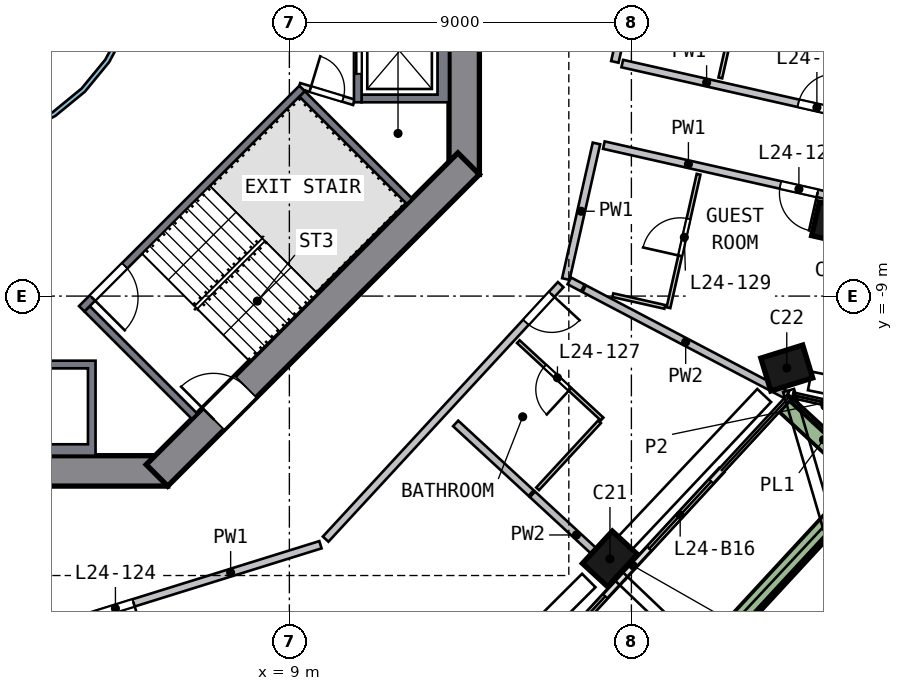
"""IFC4 building model, lengths in metres.
Left out: names, types, materials, properties, quantities, classifications, styles, units other than length and angle.
Written with IfcOpenShell. Run it as: python <this file> out.ifc"""

import sys

from ifc_helpers import new_model, si_unit, direction, frame, frame_2d, origin, origin_2d, place, context, subcontext, project, spatial, polyline, rectangle, outline, extrude, element, fill, save


model = new_model("IFC4")
c1 = context("Model", 3, precision=1e-05, world=origin(), true_north=direction((0.0, 1.0)))
c2 = subcontext(c1, "Body", "Model", "MODEL_VIEW")
j1 = project(units=[si_unit("LENGTHUNIT", "METRE"), si_unit("PLANEANGLEUNIT", "RADIAN")], contexts=[c1])
p1 = place(None, origin())
s1 = spatial("IfcSite", under=j1, at=p1, CompositionType="ELEMENT")
p2 = place(p1, origin())
s2 = spatial("IfcBuilding", under=s1, at=p2, CompositionType="ELEMENT")
p3 = place(p2, frame((0.0, 0.0, 103.5)))
s3 = spatial("IfcBuildingStorey", under=s2, at=p3, CompositionType="ELEMENT", Elevation=103.5)
p4 = place(p3, frame((17.344, -16.016, 0.0), z_axis=(0.075517991, 0.083123025, 0.993673787), x_axis=(0.674399767, 0.729776299, -0.112300969)))
e1 = element("IfcColumn", 1, at=p4, inside=s3, PredefinedType="COLUMN", context=c2, shape_type="SweptSolid", body=[
    extrude(rectangle(XDim=1.15, YDim=0.9, at=origin_2d()), origin(), (0.0, 0.0, 1.0), 3.21),
])
p5 = place(p3, frame((22.026, -11.02, 0.0), z_axis=(0.051533576, 0.105119374, 0.99312346), x_axis=(-0.953890651, -0.289264774, 0.080115647)))
e2 = element("IfcColumn", 2, at=p5, inside=s3, PredefinedType="COLUMN", context=c2, shape_type="SweptSolid", body=[
    extrude(rectangle(XDim=1.15, YDim=0.9, at=origin_2d()), origin(), (0.0, 0.0, 1.0), 3.212),
])
p6 = place(p3, frame((23.243, -7.201, 0.0), z_axis=(0.033297151, 0.110762439, 0.993288972), x_axis=(0.975227219, -0.221059294, -0.008041186)))
e3 = element("IfcColumn", 3, at=p6, inside=s3, PredefinedType="COLUMN", context=c2, shape_type="SweptSolid", body=[
    extrude(rectangle(XDim=0.9, YDim=0.9, at=origin_2d()), origin(), (0.0, 0.0, 1.0), 3.211),
])
p7 = place(p3, frame((13.6, -5.799, 0.0), z_axis=(0.0, 0.0, 1.0), x_axis=(0.0, 1.0, 0.0)))
e4 = element("IfcWall", 4, at=p7, inside=s3, PredefinedType="SHEAR", context=c2, shape_type="SweptSolid", body=[
    extrude(rectangle(XDim=11.598, YDim=0.8, at=frame_2d((5.799, 0.0))), origin(), (0.0, 0.0, 1.0), 3.5),
])
p8 = place(p7, frame((4.899, 0.0, 0.0)))
e5 = element("IfcOpeningElement", 5, at=p8, cuts=e4, PredefinedType="OPENING", context=c2, shape_type="SweptSolid", body=[
    extrude(rectangle(XDim=1.8, YDim=2.1, at=frame_2d((0.9, 1.05))), frame((0.0, 0.41, 0.0), z_axis=(0.0, -1.0, 0.0), x_axis=(1.0, 0.0, 0.0)), (0.0, 0.0, 1.0), 0.82),
])
p9 = place(p3, frame((-5.799, -13.6, 0.0), z_axis=(0.0, 0.0, 1.0), x_axis=(1.0, 0.0, 0.0)))
e6 = element("IfcWall", 6, at=p9, inside=s3, PredefinedType="SHEAR", context=c2, shape_type="SweptSolid", body=[
    extrude(rectangle(XDim=11.598, YDim=0.8, at=frame_2d((5.799, 0.0))), origin(), (0.0, 0.0, 1.0), 3.5),
])
p10 = place(p9, frame((4.899, 0.0, 0.0)))
e7 = element("IfcOpeningElement", 7, at=p10, cuts=e6, PredefinedType="OPENING", context=c2, shape_type="SweptSolid", body=[
    extrude(rectangle(XDim=1.8, YDim=2.1, at=frame_2d((0.9, 1.05))), frame((0.0, 0.41, 0.0), z_axis=(0.0, -1.0, 0.0), x_axis=(1.0, 0.0, 0.0)), (0.0, 0.0, 1.0), 0.82),
])
p11 = place(p3, frame((5.516, -13.717, 0.0), z_axis=(0.0, 0.0, 1.0), x_axis=(0.707106781, 0.707106781, 0.0)))
e8 = element("IfcWall", 8, at=p11, inside=s3, PredefinedType="SHEAR", context=c2, shape_type="SweptSolid", body=[
    extrude(rectangle(XDim=11.598, YDim=0.8, at=frame_2d((5.799, 0.0))), origin(), (0.0, 0.0, 1.0), 3.5),
])
p12 = place(p11, frame((2.099, 0.0, 0.0)))
e9 = element("IfcOpeningElement", 9, at=p12, cuts=e8, PredefinedType="OPENING", context=c2, shape_type="SweptSolid", body=[
    extrude(rectangle(XDim=1.2, YDim=2.1, at=frame_2d((0.6, 1.05))), frame((0.0, 0.41, 0.0), z_axis=(0.0, -1.0, 0.0), x_axis=(1.0, 0.0, 0.0)), (0.0, 0.0, 1.0), 0.82),
])
p13 = place(p3, frame((15.409, -18.959, 0.0), z_axis=(0.0, 0.0, 1.0), x_axis=(0.67837347, 0.734717248, 0.0)))
e10 = element("IfcWall", 10, at=p13, inside=s3, PredefinedType="SOLIDWALL", context=c2, shape_type="SweptSolid", body=[
    extrude(rectangle(XDim=3.475, YDim=0.15, at=frame_2d((1.738, 0.0))), origin(), (0.0, 0.0, 1.0), 2.425),
])
p14 = place(p13, frame((0.4, 0.0, 0.0)))
e11 = element("IfcOpeningElement", 11, at=p14, cuts=e10, PredefinedType="OPENING", context=c2, shape_type="SweptSolid", body=[
    extrude(rectangle(XDim=2.4, YDim=2.4, at=frame_2d((1.2, 1.2))), frame((0.0, 0.085, 0.0), z_axis=(0.0, -1.0, 0.0), x_axis=(1.0, 0.0, 0.0)), (0.0, 0.0, 1.0), 0.17),
])
p15 = place(p3, frame((17.767, -16.406, 0.0), z_axis=(0.0, 0.0, 1.0), x_axis=(0.678446633, 0.734649689, 0.0)))
e12 = element("IfcWall", 12, at=p15, inside=s3, PredefinedType="SOLIDWALL", context=c2, shape_type="SweptSolid", body=[
    extrude(rectangle(XDim=3.836, YDim=0.15, at=frame_2d((1.918, 0.0))), origin(), (0.0, 0.0, 1.0), 2.425),
])
p16 = place(p15, frame((1.035, 0.0, 0.0)))
e13 = element("IfcOpeningElement", 13, at=p16, cuts=e12, PredefinedType="OPENING", context=c2, shape_type="SweptSolid", body=[
    extrude(rectangle(XDim=2.4, YDim=2.4, at=frame_2d((1.2, 1.2))), frame((0.0, 0.085, 0.0), z_axis=(0.0, -1.0, 0.0), x_axis=(1.0, 0.0, 0.0)), (0.0, 0.0, 1.0), 0.17),
])
p17 = place(p3, frame((15.089, -23.765, 0.0), z_axis=(0.0, 0.0, 1.0), x_axis=(0.678421217, 0.734673161, 0.0)))
e14 = element("IfcWall", 14, at=p17, inside=s3, PredefinedType="SOLIDWALL", context=c2, shape_type="SweptSolid", body=[
    extrude(rectangle(XDim=13.723, YDim=0.5, at=frame_2d((6.862, 0.0))), origin(), (0.0, 0.0, 1.0), 0.7),
])
p18 = place(p3, frame((24.046, -13.697, 0.0), z_axis=(0.0, 0.0, 1.0), x_axis=(-0.734678586, 0.678415341, 0.0)))
e15 = element("IfcWall", 15, at=p18, inside=s3, PredefinedType="SOLIDWALL", context=c2, shape_type="SweptSolid", body=[
    extrude(rectangle(XDim=2.699, YDim=0.5, at=frame_2d((1.35, 0.0))), origin(), (0.0, 0.0, 1.0), 0.7),
])
p19 = place(p3, origin())
e16 = element("IfcWall", 16, at=p19, inside=s3, PredefinedType="SOLIDWALL", context=c2, shape_type="SweptSolid", body=[
    extrude(outline(polyline([(13.2, -3.9), (10.9, -3.9), (10.9, -3.7), (12.9, -3.7), (12.9, -1.4), (10.9, -1.4), (10.9, -1.2), (13.2, -1.2), (13.2, -3.9)])), origin(), (0.0, 0.0, 1.0), 3.19),
])
p20 = place(p3, frame((10.8, -1.2, 0.0), z_axis=(0.0, 0.0, 1.0), x_axis=(0.0, -1.0, 0.0)))
e17 = element("IfcWall", 17, at=p20, inside=s3, PredefinedType="SOLIDWALL", context=c2, shape_type="SweptSolid", body=[
    extrude(rectangle(XDim=2.7, YDim=0.2, at=frame_2d((1.35, 0.0))), origin(), (0.0, 0.0, 1.0), 3.19),
])
p21 = place(p20, frame((0.75, 0.0, 0.0)))
e18 = element("IfcOpeningElement", 18, at=p21, cuts=e17, PredefinedType="OPENING", context=c2, shape_type="SweptSolid", body=[
    extrude(rectangle(XDim=1.2, YDim=2.1, at=frame_2d((0.6, 1.05))), frame((0.0, 0.11, 0.0), z_axis=(0.0, -1.0, 0.0), x_axis=(1.0, 0.0, 0.0)), (0.0, 0.0, 1.0), 0.22),
])
p22 = place(p3, origin())
e19 = element("IfcWall", 19, at=p22, inside=s3, PredefinedType="SOLIDWALL", context=c2, shape_type="SweptSolid", body=[
    extrude(outline(polyline([(3.9, -10.7), (3.9, -13.2), (1.2, -13.2), (1.2, -10.7), (3.9, -10.7)]), holes=[polyline([(1.4, -12.9), (3.7, -12.9), (3.7, -10.9), (1.4, -10.9), (1.4, -12.9)])]), origin(), (0.0, 0.0, 1.0), 3.19),
])
p23 = place(p3, frame((9.334, -3.535, 0.0), z_axis=(0.0, 0.0, 1.0), x_axis=(-0.707106781, -0.707106781, 0.0)))
e20 = element("IfcWall", 20, at=p23, inside=s3, PredefinedType="SOLIDWALL", context=c2, shape_type="SweptSolid", body=[
    extrude(rectangle(XDim=8.2, YDim=0.2, at=frame_2d((4.1, 0.0))), origin(), (0.0, 0.0, 1.0), 3.19),
])
p24 = place(p23, frame((6.6, 0.0, 0.0)))
e21 = element("IfcOpeningElement", 21, at=p24, cuts=e20, PredefinedType="OPENING", context=c2, shape_type="SweptSolid", body=[
    extrude(rectangle(XDim=1.2, YDim=2.1, at=frame_2d((0.6, 1.05))), frame((0.0, 0.11, 0.0), z_axis=(0.0, -1.0, 0.0), x_axis=(1.0, 0.0, 0.0)), (0.0, 0.0, 1.0), 0.22),
])
for number, where, z_axis, x_axis in (
    (22, (3.677, -9.334, 0.0), (0.0, 0.0, 1.0), (0.707, -0.707, 0.0)),
    (23, (9.334, -3.677, 0.0), (0.0, 0.0, 1.0), (0.707, -0.707, 0.0)),
):
    element("IfcWall", number, at=place(p3, frame(where, z_axis=z_axis, x_axis=x_axis)), inside=s3, PredefinedType="SOLIDWALL", context=c2, shape_type="SweptSolid", body=[
        extrude(rectangle(XDim=4.0, YDim=0.2, at=frame_2d((2.0, 0.0))), origin(), (0.0, 0.0, 1.0), 3.19),
    ])
p25 = place(p3, frame((9.263, -3.465, 0.0), z_axis=(0.0, 0.0, 1.0), x_axis=(0.957084567, -0.289808785, 0.0)))
e24 = element("IfcWall", 24, at=p25, inside=s3, PredefinedType="PARTITIONING", context=c2, shape_type="SweptSolid", body=[
    extrude(rectangle(XDim=1.501, YDim=0.15, at=frame_2d((0.75, 0.0))), origin(), (0.0, 0.0, 1.0), 3.19),
])
p26 = place(p25, frame((0.301, 0.0, 0.0)))
e25 = element("IfcOpeningElement", 25, at=p26, cuts=e24, PredefinedType="OPENING", context=c2, shape_type="SweptSolid", body=[
    extrude(rectangle(XDim=0.9, YDim=2.1, at=frame_2d((0.45, 1.05))), frame((0.0, 0.085, 0.0), z_axis=(0.0, -1.0, 0.0), x_axis=(1.0, 0.0, 0.0)), (0.0, 0.0, 1.0), 0.17),
])
p27 = place(p3, origin())
e26 = element("IfcWall", 26, at=p27, inside=s3, PredefinedType="SOLIDWALL", context=c2, shape_type="SweptSolid", body=[
    extrude(outline(polyline([(5.021, -0.999), (4.73, -1.959), (4.257, -2.844), (3.62, -3.62), (2.844, -4.257), (1.959, -4.73), (0.999, -5.021), (0.0, -5.12), (-0.999, -5.021), (-1.959, -4.73), (-2.844, -4.257), (-3.62, -3.62), (-4.257, -2.844), (-4.73, -1.959), (-5.021, -0.999), (-5.12, 0.0), (-5.021, 0.999), (-4.73, 1.959), (-4.257, 2.844), (-3.62, 3.62), (-2.844, 4.257), (-1.959, 4.73), (-0.999, 5.021), (0.0, 5.12), (0.999, 5.021), (1.959, 4.73), (2.844, 4.257), (3.62, 3.62), (4.257, 2.844), (4.73, 1.959), (5.021, 0.999), (5.12, 0.0), (5.021, -0.999)]), holes=[polyline([(4.904, 0.976), (4.619, 1.913), (4.157, 2.778), (3.535, 3.535), (2.778, 4.157), (1.913, 4.619), (0.976, 4.904), (0.0, 5.0), (-0.976, 4.904), (-1.913, 4.619), (-2.778, 4.157), (-3.535, 3.535), (-4.157, 2.778), (-4.619, 1.913), (-4.904, 0.976), (-5.0, 0.0), (-4.904, -0.976), (-4.619, -1.913), (-4.157, -2.778), (-3.535, -3.535), (-2.778, -4.157), (-1.913, -4.619), (-0.976, -4.904), (0.0, -5.0), (0.976, -4.904), (1.913, -4.619), (2.778, -4.157), (3.535, -3.535), (4.157, -2.778), (4.619, -1.913), (4.904, -0.976), (5.0, 0.0), (4.904, 0.976)])]), origin(), (0.0, 0.0, 1.0), 3.19),
])
p28 = place(p3, frame((9.818, -15.543, 0.0), z_axis=(0.0, 0.0, 1.0), x_axis=(-0.954863879, -0.297043721, 0.0)))
e27 = element("IfcWall", 27, at=p28, inside=s3, PredefinedType="SOLIDWALL", context=c2, shape_type="SweptSolid", body=[
    extrude(rectangle(XDim=9.316, YDim=0.2, at=frame_2d((4.658, 0.0))), origin(), (0.0, 0.0, 1.0), 3.19),
])
p29 = place(p28, frame((5.15, 0.0, 0.0)))
e28 = element("IfcOpeningElement", 28, at=p29, cuts=e27, PredefinedType="OPENING", context=c2, shape_type="SweptSolid", body=[
    extrude(rectangle(XDim=1.0, YDim=2.1, at=frame_2d((0.5, 1.05))), frame((0.0, 0.11, 0.0), z_axis=(0.0, -1.0, 0.0), x_axis=(1.0, 0.0, 0.0)), (0.0, 0.0, 1.0), 0.22),
])
p30 = place(p3, frame((16.139, -8.698, 0.0), z_axis=(0.0, 0.0, 1.0), x_axis=(-0.678413568, -0.734680223, 0.0)))
e29 = element("IfcWall", 29, at=p30, inside=s3, PredefinedType="SOLIDWALL", context=c2, shape_type="SweptSolid", body=[
    extrude(rectangle(XDim=9.116, YDim=0.2, at=frame_2d((4.558, 0.0))), origin(), (0.0, 0.0, 1.0), 3.19),
])
p31 = place(p30, frame((0.35, 0.0, 0.0)))
e30 = element("IfcOpeningElement", 30, at=p31, cuts=e29, PredefinedType="OPENING", context=c2, shape_type="SweptSolid", body=[
    extrude(rectangle(XDim=1.0, YDim=2.1, at=frame_2d((0.5, 1.05))), frame((0.0, 0.11, 0.0), z_axis=(0.0, -1.0, 0.0), x_axis=(1.0, 0.0, 0.0)), (0.0, 0.0, 1.0), 0.22),
])
for number, where, z_axis, x_axis in (
    (31, (16.275, -8.552, 0.0), (0.0, 0.0, 1.0), (0.22, 0.975, 0.0)),
    (32, (17.565, -2.837, 0.0), (0.0, 0.0, 1.0), (0.22, 0.975, 0.0)),
):
    element("IfcWall", number, at=place(p3, frame(where, z_axis=z_axis, x_axis=x_axis)), inside=s3, PredefinedType="SOLIDWALL", context=c2, shape_type="SweptSolid", body=[
        extrude(rectangle(XDim=3.658, YDim=0.2, at=frame_2d((1.829, 0.0))), origin(), (0.0, 0.0, 1.0), 3.19),
    ])
p32 = place(p3, frame((25.139, -6.802, 0.0), z_axis=(0.0, 0.0, 1.0), x_axis=(-0.975455482, 0.220196734, 0.0)))
e33 = element("IfcWall", 33, at=p32, inside=s3, PredefinedType="SOLIDWALL", context=c2, shape_type="SweptSolid", body=[
    extrude(rectangle(XDim=8.062, YDim=0.2, at=frame_2d((4.031, 0.0))), origin(), (0.0, 0.0, 1.0), 3.19),
])
p33 = place(p32, frame((2.3, 0.0, 0.0)))
e34 = element("IfcOpeningElement", 34, at=p33, cuts=e33, PredefinedType="OPENING", context=c2, shape_type="SweptSolid", body=[
    extrude(rectangle(XDim=1.0, YDim=2.1, at=frame_2d((0.5, 1.05))), frame((0.0, 0.11, 0.0), z_axis=(0.0, -1.0, 0.0), x_axis=(1.0, 0.0, 0.0)), (0.0, 0.0, 1.0), 0.22),
])
p34 = place(p3, frame((17.76, -2.881, 0.0), z_axis=(0.0, 0.0, 1.0), x_axis=(0.975455482, -0.220196734, 0.0)))
e35 = element("IfcWall", 35, at=p34, inside=s3, PredefinedType="SOLIDWALL", context=c2, shape_type="SweptSolid", body=[
    extrude(rectangle(XDim=8.062, YDim=0.2, at=frame_2d((4.031, 0.0))), origin(), (0.0, 0.0, 1.0), 3.19),
])
p35 = place(p34, frame((4.75, 0.0, 0.0)))
e36 = element("IfcOpeningElement", 36, at=p35, cuts=e35, PredefinedType="OPENING", context=c2, shape_type="SweptSolid", body=[
    extrude(rectangle(XDim=1.0, YDim=2.1, at=frame_2d((0.5, 1.05))), frame((0.0, 0.11, 0.0), z_axis=(0.0, -1.0, 0.0), x_axis=(1.0, 0.0, 0.0)), (0.0, 0.0, 1.0), 0.22),
])
p36 = place(p3, frame((13.375, -12.351, 0.0), z_axis=(0.0, 0.0, 1.0), x_axis=(0.734709995, -0.678381326, 0.0)))
e37 = element("IfcWall", 37, at=p36, inside=s3, PredefinedType="SOLIDWALL", context=c2, shape_type="SweptSolid", body=[
    extrude(rectangle(XDim=2.705, YDim=0.2, at=frame_2d((1.352, 0.0))), origin(), (0.0, 0.0, 1.0), 3.19),
])
p37 = place(p3, frame((16.366, -8.6, 0.0), z_axis=(0.0, 0.0, 1.0), x_axis=(0.885247719, -0.465119852, 0.0)))
e38 = element("IfcWall", 38, at=p37, inside=s3, PredefinedType="SOLIDWALL", context=c2, shape_type="SweptSolid", body=[
    extrude(rectangle(XDim=0.402, YDim=0.2, at=frame_2d((0.201, 0.0))), origin(), (0.0, 0.0, 1.0), 3.19),
])
p38 = place(p3, frame((15.396, -14.217, 0.0), z_axis=(0.0, 0.0, 1.0), x_axis=(0.734663861, -0.678431287, 0.0)))
e39 = element("IfcWall", 39, at=p38, inside=s3, PredefinedType="SOLIDWALL", context=c2, shape_type="SweptSolid", body=[
    extrude(rectangle(XDim=3.152, YDim=0.2, at=frame_2d((1.576, 0.0))), origin(), (0.0, 0.0, 1.0), 3.19),
])
p39 = place(p3, frame((16.758, -8.805, 0.0), z_axis=(0.0, 0.0, 1.0), x_axis=(0.88523924, -0.465135989, 0.0)))
e40 = element("IfcWall", 40, at=p39, inside=s3, PredefinedType="SOLIDWALL", context=c2, shape_type="SweptSolid", body=[
    extrude(rectangle(XDim=6.034, YDim=0.2, at=frame_2d((3.017, 0.0))), origin(), (0.0, 0.0, 1.0), 3.19),
])
p40 = place(p3, frame((17.229, -12.235, 0.0), z_axis=(0.0, 0.0, 1.0), x_axis=(-0.73466614, 0.678428819, 0.0)))
e41 = element("IfcWall", 41, at=p40, inside=s3, PredefinedType="PARTITIONING", context=c2, shape_type="SweptSolid", body=[
    extrude(rectangle(XDim=3.0, YDim=0.1, at=frame_2d((1.5, 0.0))), origin(), (0.0, 0.0, 1.0), 3.19),
])
p41 = place(p40, frame((1.15, 0.0, 0.0)))
e42 = element("IfcOpeningElement", 42, at=p41, cuts=e41, PredefinedType="OPENING", context=c2, shape_type="SweptSolid", body=[
    extrude(rectangle(XDim=0.9, YDim=2.1, at=frame_2d((0.45, 1.05))), frame((0.0, 0.06, 0.0), z_axis=(0.0, -1.0, 0.0), x_axis=(1.0, 0.0, 0.0)), (0.0, 0.0, 1.0), 0.12),
])
p42 = place(p3, frame((17.162, -12.308, 0.0), z_axis=(0.0, 0.0, 1.0), x_axis=(-0.67847442, -0.734624027, 0.0)))
e43 = element("IfcWall", 43, at=p42, inside=s3, PredefinedType="PARTITIONING", context=c2, shape_type="SweptSolid", body=[
    extrude(rectangle(XDim=2.4, YDim=0.1, at=frame_2d((1.2, 0.0))), origin(), (0.0, 0.0, 1.0), 3.19),
])
p43 = place(p3, frame((18.877, -9.284, 0.0), z_axis=(0.0, 0.0, 1.0), x_axis=(-0.975462778, 0.220164411, 0.0)))
e44 = element("IfcWall", 44, at=p43, inside=s3, PredefinedType="PARTITIONING", context=c2, shape_type="SweptSolid", body=[
    extrude(rectangle(XDim=1.398, YDim=0.1, at=frame_2d((0.699, 0.0))), origin(), (0.0, 0.0, 1.0), 3.19),
])
p44 = place(p3, frame((18.975, -9.306, 0.0), z_axis=(0.0, 0.0, 1.0), x_axis=(0.220210913, 0.975452282, 0.0)))
e45 = element("IfcWall", 45, at=p44, inside=s3, PredefinedType="PARTITIONING", context=c2, shape_type="SweptSolid", body=[
    extrude(rectangle(XDim=3.6, YDim=0.1, at=frame_2d((1.8, 0.0))), origin(), (0.0, 0.0, 1.0), 3.19),
])
p45 = place(p44, frame((1.4, 0.0, 0.0)))
e46 = element("IfcOpeningElement", 46, at=p45, cuts=e45, PredefinedType="OPENING", context=c2, shape_type="SweptSolid", body=[
    extrude(rectangle(XDim=1.0, YDim=2.1, at=frame_2d((0.5, 1.05))), frame((0.0, 0.06, 0.0), z_axis=(0.0, -1.0, 0.0), x_axis=(1.0, 0.0, 0.0)), (0.0, 0.0, 1.0), 0.12),
])
p46 = place(p3, frame((20.34, -3.259, 0.0), z_axis=(0.0, 0.0, 1.0), x_axis=(0.220196346, 0.97545557, 0.0)))
e47 = element("IfcWall", 47, at=p46, inside=s3, PredefinedType="PARTITIONING", context=c2, shape_type="SweptSolid", body=[
    extrude(rectangle(XDim=3.6, YDim=0.1, at=frame_2d((1.8, 0.0))), origin(), (0.0, 0.0, 1.0), 3.19),
])
p47 = place(p46, frame((1.2, 0.0, 0.0)))
e48 = element("IfcOpeningElement", 48, at=p47, cuts=e47, PredefinedType="OPENING", context=c2, shape_type="SweptSolid", body=[
    extrude(rectangle(XDim=1.0, YDim=2.1, at=frame_2d((0.5, 1.05))), frame((0.0, 0.06, 0.0), z_axis=(0.0, -1.0, 0.0), x_axis=(1.0, 0.0, 0.0)), (0.0, 0.0, 1.0), 0.12),
])
p48 = place(p14, origin())
e49 = element("IfcDoor", 49, at=p48, inside=s3, OperationType="SLIDING_TO_RIGHT", PredefinedType="DOOR", context=c2, shape_type="SweptSolid", body=[
    extrude(rectangle(XDim=2.4, YDim=2.4, at=frame_2d((1.2, 1.2))), frame((0.0, 0.025, 0.0), z_axis=(0.0, -1.0, 0.0), x_axis=(1.0, 0.0, 0.0)), (0.0, 0.0, 1.0), 0.05),
])
fill(e11, e49)
p49 = place(p16, origin())
e50 = element("IfcDoor", 50, at=p49, inside=s3, OperationType="SLIDING_TO_LEFT", PredefinedType="DOOR", context=c2, shape_type="SweptSolid", body=[
    extrude(rectangle(XDim=2.4, YDim=2.4, at=frame_2d((1.2, 1.2))), frame((0.0, 0.025, 0.0), z_axis=(0.0, -1.0, 0.0), x_axis=(1.0, 0.0, 0.0)), (0.0, 0.0, 1.0), 0.05),
])
fill(e13, e50)
p50 = place(p21, origin())
e51 = element("IfcDoor", 51, at=p50, inside=s3, OperationType="DOUBLE_DOOR_SLIDING", PredefinedType="DOOR", context=c2, shape_type="SweptSolid", body=[
    extrude(rectangle(XDim=1.2, YDim=2.1, at=frame_2d((0.6, 1.05))), frame((0.0, 0.025, 0.0), z_axis=(0.0, -1.0, 0.0), x_axis=(1.0, 0.0, 0.0)), (0.0, 0.0, 1.0), 0.05),
])
fill(e18, e51)
p51 = place(p24, origin())
e52 = element("IfcDoor", 52, at=p51, inside=s3, OperationType="SINGLE_SWING_RIGHT", PredefinedType="DOOR", context=c2, shape_type="SweptSolid", body=[
    extrude(rectangle(XDim=1.2, YDim=2.1, at=frame_2d((0.6, 1.05))), frame((0.0, 0.025, 0.0), z_axis=(0.0, -1.0, 0.0), x_axis=(1.0, 0.0, 0.0)), (0.0, 0.0, 1.0), 0.05),
])
fill(e21, e52)
p52 = place(p12, origin())
e53 = element("IfcDoor", 53, at=p52, inside=s3, OperationType="SINGLE_SWING_LEFT", PredefinedType="DOOR", context=c2, shape_type="SweptSolid", body=[
    extrude(rectangle(XDim=1.2, YDim=2.1, at=frame_2d((0.6, 1.05))), frame((0.0, 0.025, 0.0), z_axis=(0.0, -1.0, 0.0), x_axis=(1.0, 0.0, 0.0)), (0.0, 0.0, 1.0), 0.05),
])
fill(e9, e53)
p53 = place(p26, origin())
e54 = element("IfcDoor", 54, at=p53, inside=s3, OperationType="SINGLE_SWING_LEFT", PredefinedType="DOOR", context=c2, shape_type="SweptSolid", body=[
    extrude(rectangle(XDim=0.9, YDim=2.1, at=frame_2d((0.45, 1.05))), frame((0.0, 0.025, 0.0), z_axis=(0.0, -1.0, 0.0), x_axis=(1.0, 0.0, 0.0)), (0.0, 0.0, 1.0), 0.05),
])
fill(e25, e54)
p54 = place(p29, origin())
e55 = element("IfcDoor", 55, at=p54, inside=s3, OperationType="SINGLE_SWING_LEFT", PredefinedType="DOOR", context=c2, shape_type="SweptSolid", body=[
    extrude(rectangle(XDim=1.0, YDim=2.1, at=frame_2d((0.5, 1.05))), frame((0.0, 0.025, 0.0), z_axis=(0.0, -1.0, 0.0), x_axis=(1.0, 0.0, 0.0)), (0.0, 0.0, 1.0), 0.05),
])
fill(e28, e55)
p55 = place(p31, origin())
e56 = element("IfcDoor", 56, at=p55, inside=s3, OperationType="SINGLE_SWING_LEFT", PredefinedType="DOOR", context=c2, shape_type="SweptSolid", body=[
    extrude(rectangle(XDim=1.0, YDim=2.1, at=frame_2d((0.5, 1.05))), frame((0.0, 0.025, 0.0), z_axis=(0.0, -1.0, 0.0), x_axis=(1.0, 0.0, 0.0)), (0.0, 0.0, 1.0), 0.05),
])
fill(e30, e56)
p56 = place(p41, origin())
e57 = element("IfcDoor", 57, at=p56, inside=s3, OperationType="SINGLE_SWING_LEFT", PredefinedType="DOOR", context=c2, shape_type="SweptSolid", body=[
    extrude(rectangle(XDim=0.9, YDim=2.1, at=frame_2d((0.45, 1.05))), frame((0.0, 0.025, 0.0), z_axis=(0.0, -1.0, 0.0), x_axis=(1.0, 0.0, 0.0)), (0.0, 0.0, 1.0), 0.05),
])
fill(e42, e57)
p57 = place(p33, origin())
e58 = element("IfcDoor", 58, at=p57, inside=s3, OperationType="SINGLE_SWING_LEFT", PredefinedType="DOOR", context=c2, shape_type="SweptSolid", body=[
    extrude(rectangle(XDim=1.0, YDim=2.1, at=frame_2d((0.5, 1.05))), frame((0.0, 0.025, 0.0), z_axis=(0.0, -1.0, 0.0), x_axis=(1.0, 0.0, 0.0)), (0.0, 0.0, 1.0), 0.05),
])
fill(e34, e58)
p58 = place(p45, origin())
e59 = element("IfcDoor", 59, at=p58, inside=s3, OperationType="SINGLE_SWING_LEFT", PredefinedType="DOOR", context=c2, shape_type="SweptSolid", body=[
    extrude(rectangle(XDim=1.0, YDim=2.1, at=frame_2d((0.5, 1.05))), frame((0.0, 0.025, 0.0), z_axis=(0.0, -1.0, 0.0), x_axis=(1.0, 0.0, 0.0)), (0.0, 0.0, 1.0), 0.05),
])
fill(e46, e59)
p59 = place(p35, origin())
e60 = element("IfcDoor", 60, at=p59, inside=s3, OperationType="SINGLE_SWING_RIGHT", PredefinedType="DOOR", context=c2, shape_type="SweptSolid", body=[
    extrude(rectangle(XDim=1.0, YDim=2.1, at=frame_2d((0.5, 1.05))), frame((0.0, 0.025, 0.0), z_axis=(0.0, -1.0, 0.0), x_axis=(1.0, 0.0, 0.0)), (0.0, 0.0, 1.0), 0.05),
])
fill(e36, e60)
save(model, sys.argv[1])
